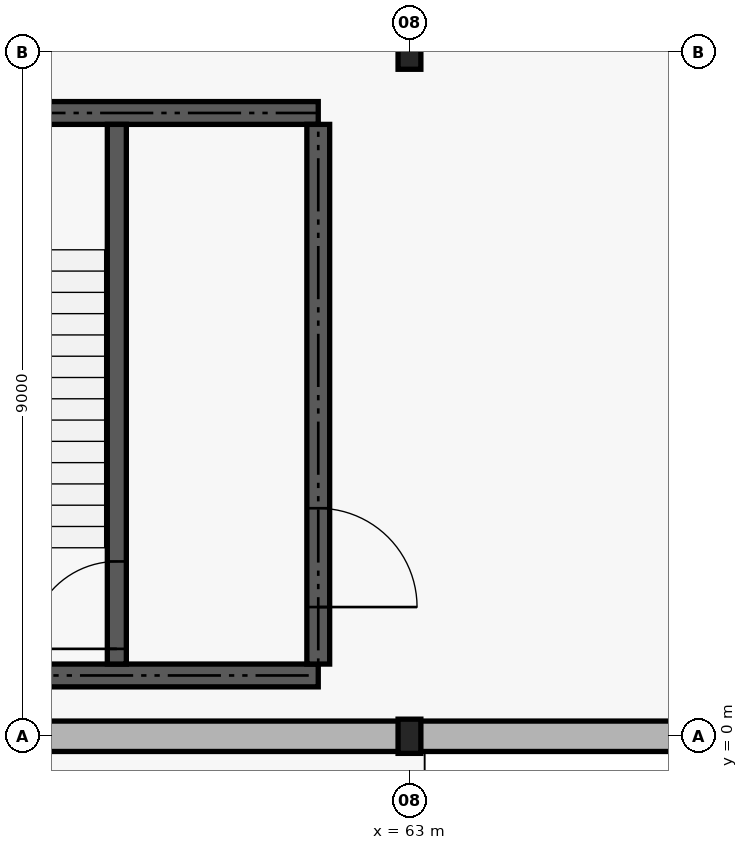
"""IFC4 building model, lengths in metres.
Left out: names, types, materials, properties, quantities, classifications, styles, units other than length and angle.
Written with IfcOpenShell. Run it as: python <this file> out.ifc"""

import sys

from ifc_helpers import new_model, si_unit, direction, frame, frame_2d, origin, origin_2d, place, context, subcontext, project, spatial, rectangle, i_section, extrude, element, fill, save


model = new_model("IFC4")
c1 = context("Model", 3, precision=1e-05, world=origin(), true_north=direction((0.0, 1.0)))
c2 = subcontext(c1, "Body", "Model", "MODEL_VIEW")
j1 = project(units=[si_unit("LENGTHUNIT", "METRE"), si_unit("PLANEANGLEUNIT", "RADIAN")], contexts=[c1])
p1 = place(None, origin())
s1 = spatial("IfcSite", under=j1, at=p1, CompositionType="ELEMENT")
p2 = place(p1, origin())
s2 = spatial("IfcBuilding", under=s1, at=p2, CompositionType="ELEMENT")
p3 = place(p2, origin())
s3 = spatial("IfcBuildingStorey", under=s2, at=p3, CompositionType="ELEMENT", Elevation=0.0)
for number, where, z_axis, x_axis in (
    (1, (63.0, 0.0, 0.0), (0.0, 0.0, 1.0), (1.0, 0.0, 0.0)),
    (2, (63.0, 9.0, 0.0), (0.0, 0.0, 1.0), (1.0, 0.0, 0.0)),
):
    element("IfcColumn", number, at=place(p3, frame(where, z_axis=z_axis, x_axis=x_axis)), inside=s3, PredefinedType="COLUMN", context=c2, shape_type="SweptSolid", body=[
        extrude(i_section(OverallWidth=0.3, OverallDepth=0.45, WebThickness=0.014, FlangeThickness=0.026, FilletRadius=0.027, at=origin_2d()), origin(), (0.0, 0.0, 1.0), 5.4),
    ])
for number, where, z_axis, x_axis in (
    (3, (54.06, 0.0, 0.0), (0.0, 0.0, 1.0), (1.0, 0.0, 0.0)),
    (4, (63.06, 0.0, 0.0), (0.0, 0.0, 1.0), (1.0, 0.0, 0.0)),
):
    element("IfcWall", number, at=place(p3, frame(where, z_axis=z_axis, x_axis=x_axis)), inside=s3, PredefinedType="SOLIDWALL", context=c2, shape_type="SweptSolid", body=[
        extrude(rectangle(XDim=8.88, YDim=0.4, at=frame_2d((4.44, 0.0))), origin(), (0.0, 0.0, 1.0), 4.7),
    ])
p4 = place(p3, frame((55.2, 0.8, 0.0), z_axis=(0.0, 0.0, 1.0), x_axis=(1.0, 0.0, 0.0)))
e5 = element("IfcWall", 5, at=p4, inside=s3, PredefinedType="SHEAR", context=c2, shape_type="SweptSolid", body=[
    extrude(rectangle(XDim=6.6, YDim=0.3, at=frame_2d((3.3, 0.0))), origin(), (0.0, 0.0, 1.0), 5.4),
])
p5 = place(p4, frame((1.0, 0.0, 0.0)))
e6 = element("IfcOpeningElement", 6, at=p5, cuts=e5, PredefinedType="OPENING", context=c2, shape_type="SweptSolid", body=[
    extrude(rectangle(XDim=1.8, YDim=2.15, at=frame_2d((0.9, 1.075))), frame((0.0, 0.16, 0.0), z_axis=(0.0, -1.0, 0.0), x_axis=(1.0, 0.0, 0.0)), (0.0, 0.0, 1.0), 0.32),
])
p6 = place(p3, frame((55.2, 8.2, 0.0), z_axis=(0.0, 0.0, 1.0), x_axis=(1.0, 0.0, 0.0)))
e7 = element("IfcWall", 7, at=p6, inside=s3, PredefinedType="SHEAR", context=c2, shape_type="SweptSolid", body=[
    extrude(rectangle(XDim=6.6, YDim=0.3, at=frame_2d((3.3, 0.0))), origin(), (0.0, 0.0, 1.0), 5.4),
])
p7 = place(p3, frame((61.8, 0.95, 0.0), z_axis=(0.0, 0.0, 1.0), x_axis=(0.0, 1.0, 0.0)))
e8 = element("IfcWall", 8, at=p7, inside=s3, PredefinedType="SHEAR", context=c2, shape_type="SweptSolid", body=[
    extrude(rectangle(XDim=7.1, YDim=0.3, at=frame_2d((3.55, 0.0))), origin(), (0.0, 0.0, 1.0), 5.4),
])
p8 = place(p7, frame((0.75, 0.0, 0.0)))
e9 = element("IfcOpeningElement", 9, at=p8, cuts=e8, PredefinedType="OPENING", context=c2, shape_type="SweptSolid", body=[
    extrude(rectangle(XDim=1.3, YDim=2.15, at=frame_2d((0.65, 1.075))), frame((0.0, 0.16, 0.0), z_axis=(0.0, -1.0, 0.0), x_axis=(1.0, 0.0, 0.0)), (0.0, 0.0, 1.0), 0.32),
])
p9 = place(p3, frame((59.15, 0.95, 0.0), z_axis=(0.0, 0.0, 1.0), x_axis=(0.0, 1.0, 0.0)))
e10 = element("IfcWall", 10, at=p9, inside=s3, PredefinedType="SHEAR", context=c2, shape_type="SweptSolid", body=[
    extrude(rectangle(XDim=7.1, YDim=0.25, at=frame_2d((3.55, 0.0))), origin(), (0.0, 0.0, 1.0), 5.4),
])
p10 = place(p9, frame((0.2, 0.0, 0.0)))
e11 = element("IfcOpeningElement", 11, at=p10, cuts=e10, PredefinedType="OPENING", context=c2, shape_type="SweptSolid", body=[
    extrude(rectangle(XDim=1.15, YDim=2.15, at=frame_2d((0.575, 1.075))), frame((0.0, 0.135, 0.0), z_axis=(0.0, -1.0, 0.0), x_axis=(1.0, 0.0, 0.0)), (0.0, 0.0, 1.0), 0.27),
])
p11 = place(p8, frame((1.3, 0.0, 0.0), z_axis=(0.0, 0.0, 1.0), x_axis=(-1.0, 0.0, 0.0)))
e12 = element("IfcDoor", 12, at=p11, inside=s3, OperationType="DOUBLE_DOOR_SINGLE_SWING", PredefinedType="DOOR", context=c2, shape_type="SweptSolid", body=[
    extrude(rectangle(XDim=1.3, YDim=2.15, at=frame_2d((0.65, 1.075))), frame((0.0, 0.025, 0.0), z_axis=(0.0, -1.0, 0.0), x_axis=(1.0, 0.0, 0.0)), (0.0, 0.0, 1.0), 0.05),
])
fill(e9, e12)
p12 = place(p10, origin())
e13 = element("IfcDoor", 13, at=p12, inside=s3, OperationType="SINGLE_SWING_LEFT", PredefinedType="DOOR", context=c2, shape_type="SweptSolid", body=[
    extrude(rectangle(XDim=1.15, YDim=2.15, at=frame_2d((0.575, 1.075))), frame((0.0, 0.025, 0.0), z_axis=(0.0, -1.0, 0.0), x_axis=(1.0, 0.0, 0.0)), (0.0, 0.0, 1.0), 0.05),
])
fill(e11, e13)
save(model, sys.argv[1])
